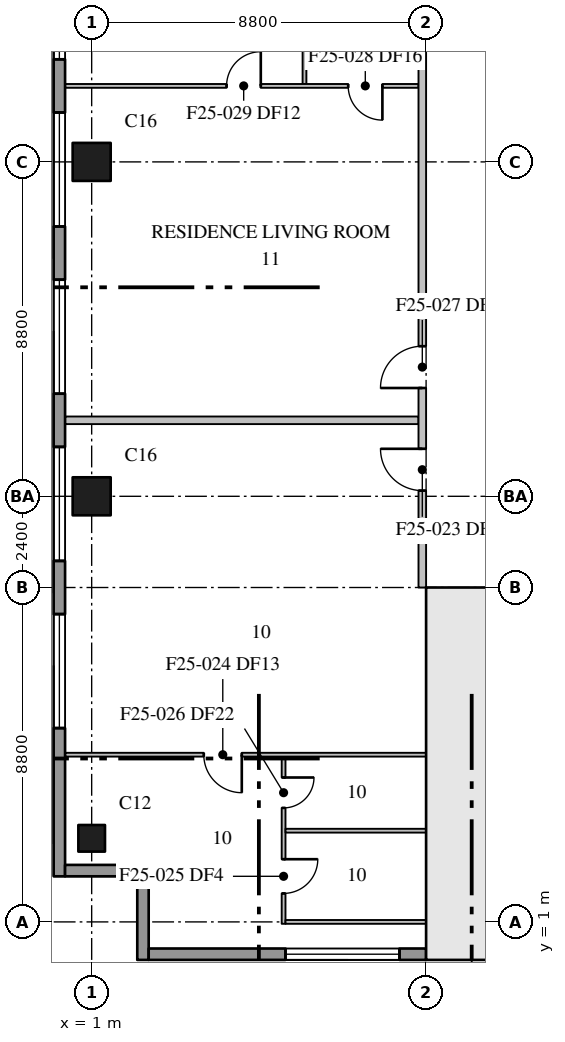
"""IFC4 building model, lengths in metres.
Left out: names, types, materials, properties, quantities, classifications, styles, units other than length and angle.
Written with IfcOpenShell. Run it as: python <this file> out.ifc"""

import sys

from ifc_helpers import new_model, si_unit, direction, frame, frame_2d, origin, origin_2d, place, context, subcontext, project, spatial, rectangle, extrude, element, fill, save


model = new_model("IFC4")
c1 = context("Model", 3, precision=1e-05, world=origin(), true_north=direction((0.0, 1.0)))
c2 = subcontext(c1, "Body", "Model", "MODEL_VIEW")
j1 = project(units=[si_unit("LENGTHUNIT", "METRE"), si_unit("PLANEANGLEUNIT", "RADIAN")], contexts=[c1])
p1 = place(None, origin())
s1 = spatial("IfcSite", under=j1, at=p1, CompositionType="ELEMENT")
p2 = place(p1, origin())
s2 = spatial("IfcBuilding", under=s1, at=p2, CompositionType="ELEMENT")
p3 = place(p2, frame((0.0, 0.0, 211.7)))
s3 = spatial("IfcBuildingStorey", under=s2, at=p3, CompositionType="ELEMENT", Elevation=211.7)
p4 = place(p3, frame((1.0, 3.2, 0.0), z_axis=(0.0, 0.0, 1.0), x_axis=(1.0, 0.0, 0.0)))
e1 = element("IfcColumn", 1, at=p4, inside=s3, PredefinedType="COLUMN", context=c2, shape_type="SweptSolid", body=[
    extrude(rectangle(XDim=0.7, YDim=0.7, at=origin_2d()), origin(), (0.0, 0.0, 1.0), 3.7),
])
for number, where, z_axis, x_axis in (
    (2, (1.0, 12.2, 0.0), (0.0, 0.0, 1.0), (1.0, 0.0, 0.0)),
    (3, (1.0, 21.0, 0.0), (0.0, 0.0, 1.0), (1.0, 0.0, 0.0)),
):
    element("IfcColumn", number, at=place(p3, frame(where, z_axis=z_axis, x_axis=x_axis)), inside=s3, PredefinedType="COLUMN", context=c2, shape_type="SweptSolid", body=[
        extrude(rectangle(XDim=1.0, YDim=1.0, at=origin_2d()), origin(), (0.0, 0.0, 1.0), 3.7),
    ])
p5 = place(p3, frame((9.8, 0.875, 0.0), z_axis=(0.0, 0.0, 1.0), x_axis=(1.0, 0.0, 0.0)))
e4 = element("IfcWall", 4, at=p5, inside=s3, PredefinedType="SHEAR", context=c2, shape_type="SweptSolid", body=[
    extrude(rectangle(XDim=35.2, YDim=0.65, at=frame_2d((17.6, 0.0))), origin(), (0.0, 0.0, 1.0), 3.7),
])
p6 = place(p3, frame((10.675, 1.2, 0.0), z_axis=(0.0, 0.0, 1.0), x_axis=(0.0, 1.0, 0.0)))
e5 = element("IfcWall", 5, at=p6, inside=s3, PredefinedType="SHEAR", context=c2, shape_type="SweptSolid", body=[
    extrude(rectangle(XDim=8.6, YDim=0.65, at=frame_2d((4.3, 0.0))), origin(), (0.0, 0.0, 1.0), 3.7),
])
p7 = place(p3, frame((9.8, 9.6, 0.0), z_axis=(0.0, 0.0, 1.0), x_axis=(1.0, 0.0, 0.0)))
e6 = element("IfcWall", 6, at=p7, inside=s3, PredefinedType="SHEAR", context=c2, shape_type="SweptSolid", body=[
    extrude(rectangle(XDim=4.3, YDim=0.4, at=frame_2d((2.15, 0.0))), origin(), (0.0, 0.0, 1.0), 3.7),
])
p8 = place(p7, frame((2.05, 0.0, 0.0)))
e7 = element("IfcOpeningElement", 7, at=p8, cuts=e6, PredefinedType="OPENING", context=c2, shape_type="SweptSolid", body=[
    extrude(rectangle(XDim=1.2, YDim=2.1, at=frame_2d((0.6, 1.05))), frame((0.0, 0.21, 0.0), z_axis=(0.0, -1.0, 0.0), x_axis=(1.0, 0.0, 0.0)), (0.0, 0.0, 1.0), 0.42),
])
p9 = place(p3, frame((0.15, 61.1, 0.0), z_axis=(0.0, 0.0, 1.0), x_axis=(0.0, -1.0, 0.0)))
e8 = element("IfcWall", 8, at=p9, inside=s3, PredefinedType="STANDARD", context=c2, shape_type="SweptSolid", body=[
    extrude(rectangle(XDim=58.9, YDim=0.3, at=frame_2d((29.45, 0.0))), origin(), (0.0, 0.0, 1.0), 3.4),
])
p10 = place(p9, frame((3.6, 0.0, 0.75)))
e9 = element("IfcOpeningElement", 9, at=p10, cuts=e8, PredefinedType="OPENING", context=c2, shape_type="SweptSolid", body=[
    extrude(rectangle(XDim=3.0, YDim=2.3, at=frame_2d((1.5, 1.15))), frame((0.0, 0.16, 0.0), z_axis=(0.0, -1.0, 0.0), x_axis=(1.0, 0.0, 0.0)), (0.0, 0.0, 1.0), 0.32),
])
p11 = place(p9, frame((8.0, 0.0, 0.75)))
e10 = element("IfcOpeningElement", 10, at=p11, cuts=e8, PredefinedType="OPENING", context=c2, shape_type="SweptSolid", body=[
    extrude(rectangle(XDim=3.0, YDim=2.3, at=frame_2d((1.5, 1.15))), frame((0.0, 0.16, 0.0), z_axis=(0.0, -1.0, 0.0), x_axis=(1.0, 0.0, 0.0)), (0.0, 0.0, 1.0), 0.32),
])
p12 = place(p9, frame((12.4, 0.0, 0.75)))
e11 = element("IfcOpeningElement", 11, at=p12, cuts=e8, PredefinedType="OPENING", context=c2, shape_type="SweptSolid", body=[
    extrude(rectangle(XDim=3.0, YDim=2.3, at=frame_2d((1.5, 1.15))), frame((0.0, 0.16, 0.0), z_axis=(0.0, -1.0, 0.0), x_axis=(1.0, 0.0, 0.0)), (0.0, 0.0, 1.0), 0.32),
])
p13 = place(p9, frame((16.8, 0.0, 0.75)))
e12 = element("IfcOpeningElement", 12, at=p13, cuts=e8, PredefinedType="OPENING", context=c2, shape_type="SweptSolid", body=[
    extrude(rectangle(XDim=3.0, YDim=2.3, at=frame_2d((1.5, 1.15))), frame((0.0, 0.16, 0.0), z_axis=(0.0, -1.0, 0.0), x_axis=(1.0, 0.0, 0.0)), (0.0, 0.0, 1.0), 0.32),
])
p14 = place(p9, frame((21.2, 0.0, 0.75)))
e13 = element("IfcOpeningElement", 13, at=p14, cuts=e8, PredefinedType="OPENING", context=c2, shape_type="SweptSolid", body=[
    extrude(rectangle(XDim=3.0, YDim=2.3, at=frame_2d((1.5, 1.15))), frame((0.0, 0.16, 0.0), z_axis=(0.0, -1.0, 0.0), x_axis=(1.0, 0.0, 0.0)), (0.0, 0.0, 1.0), 0.32),
])
p15 = place(p9, frame((25.6, 0.0, 0.75)))
e14 = element("IfcOpeningElement", 14, at=p15, cuts=e8, PredefinedType="OPENING", context=c2, shape_type="SweptSolid", body=[
    extrude(rectangle(XDim=3.0, YDim=2.3, at=frame_2d((1.5, 1.15))), frame((0.0, 0.16, 0.0), z_axis=(0.0, -1.0, 0.0), x_axis=(1.0, 0.0, 0.0)), (0.0, 0.0, 1.0), 0.32),
])
p16 = place(p9, frame((30.0, 0.0, 0.75)))
e15 = element("IfcOpeningElement", 15, at=p16, cuts=e8, PredefinedType="OPENING", context=c2, shape_type="SweptSolid", body=[
    extrude(rectangle(XDim=3.0, YDim=2.3, at=frame_2d((1.5, 1.15))), frame((0.0, 0.16, 0.0), z_axis=(0.0, -1.0, 0.0), x_axis=(1.0, 0.0, 0.0)), (0.0, 0.0, 1.0), 0.32),
])
p17 = place(p9, frame((34.4, 0.0, 0.75)))
e16 = element("IfcOpeningElement", 16, at=p17, cuts=e8, PredefinedType="OPENING", context=c2, shape_type="SweptSolid", body=[
    extrude(rectangle(XDim=3.0, YDim=2.3, at=frame_2d((1.5, 1.15))), frame((0.0, 0.16, 0.0), z_axis=(0.0, -1.0, 0.0), x_axis=(1.0, 0.0, 0.0)), (0.0, 0.0, 1.0), 0.32),
])
p18 = place(p9, frame((38.8, 0.0, 0.75)))
e17 = element("IfcOpeningElement", 17, at=p18, cuts=e8, PredefinedType="OPENING", context=c2, shape_type="SweptSolid", body=[
    extrude(rectangle(XDim=3.0, YDim=2.3, at=frame_2d((1.5, 1.15))), frame((0.0, 0.16, 0.0), z_axis=(0.0, -1.0, 0.0), x_axis=(1.0, 0.0, 0.0)), (0.0, 0.0, 1.0), 0.32),
])
p19 = place(p9, frame((43.2, 0.0, 0.75)))
e18 = element("IfcOpeningElement", 18, at=p19, cuts=e8, PredefinedType="OPENING", context=c2, shape_type="SweptSolid", body=[
    extrude(rectangle(XDim=3.0, YDim=2.3, at=frame_2d((1.5, 1.15))), frame((0.0, 0.16, 0.0), z_axis=(0.0, -1.0, 0.0), x_axis=(1.0, 0.0, 0.0)), (0.0, 0.0, 1.0), 0.32),
])
p20 = place(p9, frame((47.6, 0.0, 0.75)))
e19 = element("IfcOpeningElement", 19, at=p20, cuts=e8, PredefinedType="OPENING", context=c2, shape_type="SweptSolid", body=[
    extrude(rectangle(XDim=3.0, YDim=2.3, at=frame_2d((1.5, 1.15))), frame((0.0, 0.16, 0.0), z_axis=(0.0, -1.0, 0.0), x_axis=(1.0, 0.0, 0.0)), (0.0, 0.0, 1.0), 0.32),
])
p21 = place(p9, frame((52.0, 0.0, 0.75)))
e20 = element("IfcOpeningElement", 20, at=p21, cuts=e8, PredefinedType="OPENING", context=c2, shape_type="SweptSolid", body=[
    extrude(rectangle(XDim=3.0, YDim=2.3, at=frame_2d((1.5, 1.15))), frame((0.0, 0.16, 0.0), z_axis=(0.0, -1.0, 0.0), x_axis=(1.0, 0.0, 0.0)), (0.0, 0.0, 1.0), 0.32),
])
for number, where, z_axis, x_axis in (
    (21, (0.3, 2.35, 0.0), (0.0, 0.0, 1.0), (1.0, 0.0, 0.0)),
    (22, (2.35, 2.2, 0.0), (0.0, 0.0, 1.0), (0.0, -1.0, 0.0)),
):
    element("IfcWall", number, at=place(p3, frame(where, z_axis=z_axis, x_axis=x_axis)), inside=s3, PredefinedType="STANDARD", context=c2, shape_type="SweptSolid", body=[
        extrude(rectangle(XDim=2.2, YDim=0.3, at=frame_2d((1.1, 0.0))), origin(), (0.0, 0.0, 1.0), 3.4),
    ])
p22 = place(p3, frame((2.5, 0.15, 0.0), z_axis=(0.0, 0.0, 1.0), x_axis=(1.0, 0.0, 0.0)))
e23 = element("IfcWall", 23, at=p22, inside=s3, PredefinedType="STANDARD", context=c2, shape_type="SweptSolid", body=[
    extrude(rectangle(XDim=7.3, YDim=0.3, at=frame_2d((3.65, 0.0))), origin(), (0.0, 0.0, 1.0), 3.4),
])
p23 = place(p22, frame((3.6, 0.0, 0.75)))
e24 = element("IfcOpeningElement", 24, at=p23, cuts=e23, PredefinedType="OPENING", context=c2, shape_type="SweptSolid", body=[
    extrude(rectangle(XDim=3.0, YDim=2.3, at=frame_2d((1.5, 1.15))), frame((0.0, 0.16, 0.0), z_axis=(0.0, -1.0, 0.0), x_axis=(1.0, 0.0, 0.0)), (0.0, 0.0, 1.0), 0.32),
])
p24 = place(p3, frame((9.7, 9.8, 0.0), z_axis=(0.0, 0.0, 1.0), x_axis=(0.0, 1.0, 0.0)))
e25 = element("IfcWall", 25, at=p24, inside=s3, PredefinedType="PARTITIONING", context=c2, shape_type="SweptSolid", body=[
    extrude(rectangle(XDim=17.6, YDim=0.2, at=frame_2d((8.8, 0.0))), origin(), (0.0, 0.0, 1.0), 3.4),
])
p25 = place(p24, frame((2.55, 0.0, 0.0)))
e26 = element("IfcOpeningElement", 26, at=p25, cuts=e25, PredefinedType="OPENING", context=c2, shape_type="SweptSolid", body=[
    extrude(rectangle(XDim=1.1, YDim=2.1, at=frame_2d((0.55, 1.05))), frame((0.0, 0.11, 0.0), z_axis=(0.0, -1.0, 0.0), x_axis=(1.0, 0.0, 0.0)), (0.0, 0.0, 1.0), 0.22),
])
p26 = place(p24, frame((5.25, 0.0, 0.0)))
e27 = element("IfcOpeningElement", 27, at=p26, cuts=e25, PredefinedType="OPENING", context=c2, shape_type="SweptSolid", body=[
    extrude(rectangle(XDim=1.1, YDim=2.1, at=frame_2d((0.55, 1.05))), frame((0.0, 0.11, 0.0), z_axis=(0.0, -1.0, 0.0), x_axis=(1.0, 0.0, 0.0)), (0.0, 0.0, 1.0), 0.22),
])
p27 = place(p3, frame((0.31, 14.2, 0.0), z_axis=(0.0, 0.0, 1.0), x_axis=(1.0, 0.0, 0.0)))
e28 = element("IfcWall", 28, at=p27, inside=s3, PredefinedType="PARTITIONING", context=c2, shape_type="SweptSolid", body=[
    extrude(rectangle(XDim=9.29, YDim=0.2, at=frame_2d((4.645, 0.0))), origin(), (0.0, 0.0, 1.0), 3.4),
])
p28 = place(p3, frame((6.05, 5.35, 0.0), z_axis=(0.0, 0.0, 1.0), x_axis=(0.0, -1.0, 0.0)))
e29 = element("IfcWall", 29, at=p28, inside=s3, PredefinedType="PARTITIONING", context=c2, shape_type="SweptSolid", body=[
    extrude(rectangle(XDim=4.4, YDim=0.1, at=frame_2d((2.2, 0.0))), origin(), (0.0, 0.0, 1.0), 3.4),
])
p29 = place(p28, frame((2.7, 0.0, 0.0)))
e30 = element("IfcOpeningElement", 30, at=p29, cuts=e29, PredefinedType="OPENING", context=c2, shape_type="SweptSolid", body=[
    extrude(rectangle(XDim=0.9, YDim=2.1, at=frame_2d((0.45, 1.05))), frame((0.0, 0.06, 0.0), z_axis=(0.0, -1.0, 0.0), x_axis=(1.0, 0.0, 0.0)), (0.0, 0.0, 1.0), 0.12),
])
p30 = place(p28, frame((0.55, 0.0, 0.0)))
e31 = element("IfcOpeningElement", 31, at=p30, cuts=e29, PredefinedType="OPENING", context=c2, shape_type="SweptSolid", body=[
    extrude(rectangle(XDim=0.8, YDim=2.1, at=frame_2d((0.4, 1.05))), frame((0.0, 0.06, 0.0), z_axis=(0.0, -1.0, 0.0), x_axis=(1.0, 0.0, 0.0)), (0.0, 0.0, 1.0), 0.12),
])
p31 = place(p3, frame((9.8, 5.4, 0.0), z_axis=(0.0, 0.0, 1.0), x_axis=(-1.0, 0.0, 0.0)))
e32 = element("IfcWall", 32, at=p31, inside=s3, PredefinedType="PARTITIONING", context=c2, shape_type="SweptSolid", body=[
    extrude(rectangle(XDim=9.49, YDim=0.1, at=frame_2d((4.745, 0.0))), origin(), (0.0, 0.0, 1.0), 3.4),
])
p32 = place(p31, frame((4.85, 0.0, 0.0)))
e33 = element("IfcOpeningElement", 33, at=p32, cuts=e32, PredefinedType="OPENING", context=c2, shape_type="SweptSolid", body=[
    extrude(rectangle(XDim=1.0, YDim=2.1, at=frame_2d((0.5, 1.05))), frame((0.0, 0.06, 0.0), z_axis=(0.0, -1.0, 0.0), x_axis=(1.0, 0.0, 0.0)), (0.0, 0.0, 1.0), 0.12),
])
for number, where, z_axis, x_axis in (
    (34, (6.1, 1.0, 0.0), (0.0, 0.0, 1.0), (1.0, 0.0, 0.0)),
    (35, (6.1, 3.4, 0.0), (0.0, 0.0, 1.0), (1.0, 0.0, 0.0)),
):
    element("IfcWall", number, at=place(p3, frame(where, z_axis=z_axis, x_axis=x_axis)), inside=s3, PredefinedType="PARTITIONING", context=c2, shape_type="SweptSolid", body=[
        extrude(rectangle(XDim=3.7, YDim=0.1, at=frame_2d((1.85, 0.0))), origin(), (0.0, 0.0, 1.0), 3.4),
    ])
p33 = place(p3, frame((6.6, 27.2, 0.0), z_axis=(0.0, 0.0, 1.0), x_axis=(0.0, -1.0, 0.0)))
e36 = element("IfcWall", 36, at=p33, inside=s3, PredefinedType="PARTITIONING", context=c2, shape_type="SweptSolid", body=[
    extrude(rectangle(XDim=4.15, YDim=0.1, at=frame_2d((2.075, 0.0))), origin(), (0.0, 0.0, 1.0), 3.4),
])
p34 = place(p33, frame((0.25, 0.0, 0.0)))
e37 = element("IfcOpeningElement", 37, at=p34, cuts=e36, PredefinedType="OPENING", context=c2, shape_type="SweptSolid", body=[
    extrude(rectangle(XDim=0.9, YDim=2.1, at=frame_2d((0.45, 1.05))), frame((0.0, 0.06, 0.0), z_axis=(0.0, -1.0, 0.0), x_axis=(1.0, 0.0, 0.0)), (0.0, 0.0, 1.0), 0.12),
])
p35 = place(p3, frame((0.31, 23.0, 0.0), z_axis=(0.0, 0.0, 1.0), x_axis=(1.0, 0.0, 0.0)))
e38 = element("IfcWall", 38, at=p35, inside=s3, PredefinedType="PARTITIONING", context=c2, shape_type="SweptSolid", body=[
    extrude(rectangle(XDim=9.29, YDim=0.1, at=frame_2d((4.645, 0.0))), origin(), (0.0, 0.0, 1.0), 3.4),
])
p36 = place(p35, frame((7.44, 0.0, 0.0)))
e39 = element("IfcOpeningElement", 39, at=p36, cuts=e38, PredefinedType="OPENING", context=c2, shape_type="SweptSolid", body=[
    extrude(rectangle(XDim=0.9, YDim=2.1, at=frame_2d((0.45, 1.05))), frame((0.0, 0.06, 0.0), z_axis=(0.0, -1.0, 0.0), x_axis=(1.0, 0.0, 0.0)), (0.0, 0.0, 1.0), 0.12),
])
p37 = place(p35, frame((4.24, 0.0, 0.0)))
e40 = element("IfcOpeningElement", 40, at=p37, cuts=e38, PredefinedType="OPENING", context=c2, shape_type="SweptSolid", body=[
    extrude(rectangle(XDim=0.9, YDim=2.1, at=frame_2d((0.45, 1.05))), frame((0.0, 0.06, 0.0), z_axis=(0.0, -1.0, 0.0), x_axis=(1.0, 0.0, 0.0)), (0.0, 0.0, 1.0), 0.12),
])
p38 = place(p17, origin())
e41 = element("IfcWindow", 41, at=p38, inside=s3, PartitioningType="SINGLE_PANEL", PredefinedType="WINDOW", context=c2, shape_type="SweptSolid", body=[
    extrude(rectangle(XDim=3.0, YDim=2.3, at=frame_2d((1.5, 1.15))), frame((0.0, 0.03, 0.0), z_axis=(0.0, -1.0, 0.0), x_axis=(1.0, 0.0, 0.0)), (0.0, 0.0, 1.0), 0.06),
])
fill(e16, e41)
p39 = place(p18, origin())
e42 = element("IfcWindow", 42, at=p39, inside=s3, PartitioningType="SINGLE_PANEL", PredefinedType="WINDOW", context=c2, shape_type="SweptSolid", body=[
    extrude(rectangle(XDim=3.0, YDim=2.3, at=frame_2d((1.5, 1.15))), frame((0.0, 0.03, 0.0), z_axis=(0.0, -1.0, 0.0), x_axis=(1.0, 0.0, 0.0)), (0.0, 0.0, 1.0), 0.06),
])
fill(e17, e42)
p40 = place(p19, origin())
e43 = element("IfcWindow", 43, at=p40, inside=s3, PartitioningType="SINGLE_PANEL", PredefinedType="WINDOW", context=c2, shape_type="SweptSolid", body=[
    extrude(rectangle(XDim=3.0, YDim=2.3, at=frame_2d((1.5, 1.15))), frame((0.0, 0.03, 0.0), z_axis=(0.0, -1.0, 0.0), x_axis=(1.0, 0.0, 0.0)), (0.0, 0.0, 1.0), 0.06),
])
fill(e18, e43)
p41 = place(p20, origin())
e44 = element("IfcWindow", 44, at=p41, inside=s3, PartitioningType="SINGLE_PANEL", PredefinedType="WINDOW", context=c2, shape_type="SweptSolid", body=[
    extrude(rectangle(XDim=3.0, YDim=2.3, at=frame_2d((1.5, 1.15))), frame((0.0, 0.03, 0.0), z_axis=(0.0, -1.0, 0.0), x_axis=(1.0, 0.0, 0.0)), (0.0, 0.0, 1.0), 0.06),
])
fill(e19, e44)
p42 = place(p21, origin())
e45 = element("IfcWindow", 45, at=p42, inside=s3, PartitioningType="SINGLE_PANEL", PredefinedType="WINDOW", context=c2, shape_type="SweptSolid", body=[
    extrude(rectangle(XDim=3.0, YDim=2.3, at=frame_2d((1.5, 1.15))), frame((0.0, 0.03, 0.0), z_axis=(0.0, -1.0, 0.0), x_axis=(1.0, 0.0, 0.0)), (0.0, 0.0, 1.0), 0.06),
])
fill(e20, e45)
p43 = place(p23, origin())
e46 = element("IfcWindow", 46, at=p43, inside=s3, PartitioningType="SINGLE_PANEL", PredefinedType="WINDOW", context=c2, shape_type="SweptSolid", body=[
    extrude(rectangle(XDim=3.0, YDim=2.3, at=frame_2d((1.5, 1.15))), frame((0.0, 0.03, 0.0), z_axis=(0.0, -1.0, 0.0), x_axis=(1.0, 0.0, 0.0)), (0.0, 0.0, 1.0), 0.06),
])
fill(e24, e46)
p44 = place(p25, origin())
e47 = element("IfcDoor", 47, at=p44, inside=s3, OperationType="SINGLE_SWING_RIGHT", PredefinedType="DOOR", context=c2, shape_type="SweptSolid", body=[
    extrude(rectangle(XDim=1.1, YDim=2.1, at=frame_2d((0.55, 1.05))), frame((0.0, 0.025, 0.0), z_axis=(0.0, -1.0, 0.0), x_axis=(1.0, 0.0, 0.0)), (0.0, 0.0, 1.0), 0.05),
])
fill(e26, e47)
p45 = place(p32, origin())
e48 = element("IfcDoor", 48, at=p45, inside=s3, OperationType="SINGLE_SWING_LEFT", PredefinedType="DOOR", context=c2, shape_type="SweptSolid", body=[
    extrude(rectangle(XDim=1.0, YDim=2.1, at=frame_2d((0.5, 1.05))), frame((0.0, 0.025, 0.0), z_axis=(0.0, -1.0, 0.0), x_axis=(1.0, 0.0, 0.0)), (0.0, 0.0, 1.0), 0.05),
])
fill(e33, e48)
p46 = place(p29, origin())
e49 = element("IfcDoor", 49, at=p46, inside=s3, OperationType="SINGLE_SWING_LEFT", PredefinedType="DOOR", context=c2, shape_type="SweptSolid", body=[
    extrude(rectangle(XDim=0.9, YDim=2.1, at=frame_2d((0.45, 1.05))), frame((0.0, 0.025, 0.0), z_axis=(0.0, -1.0, 0.0), x_axis=(1.0, 0.0, 0.0)), (0.0, 0.0, 1.0), 0.05),
])
fill(e30, e49)
p47 = place(p30, origin())
e50 = element("IfcDoor", 50, at=p47, inside=s3, OperationType="SINGLE_SWING_LEFT", PredefinedType="DOOR", context=c2, shape_type="SweptSolid", body=[
    extrude(rectangle(XDim=0.8, YDim=2.1, at=frame_2d((0.4, 1.05))), frame((0.0, 0.025, 0.0), z_axis=(0.0, -1.0, 0.0), x_axis=(1.0, 0.0, 0.0)), (0.0, 0.0, 1.0), 0.05),
])
fill(e31, e50)
p48 = place(p26, origin())
e51 = element("IfcDoor", 51, at=p48, inside=s3, OperationType="SINGLE_SWING_LEFT", PredefinedType="DOOR", context=c2, shape_type="SweptSolid", body=[
    extrude(rectangle(XDim=1.1, YDim=2.1, at=frame_2d((0.55, 1.05))), frame((0.0, 0.025, 0.0), z_axis=(0.0, -1.0, 0.0), x_axis=(1.0, 0.0, 0.0)), (0.0, 0.0, 1.0), 0.05),
])
fill(e27, e51)
p49 = place(p36, frame((0.9, 0.0, 0.0), z_axis=(0.0, 0.0, 1.0), x_axis=(-1.0, 0.0, 0.0)))
e52 = element("IfcDoor", 52, at=p49, inside=s3, OperationType="SINGLE_SWING_RIGHT", PredefinedType="DOOR", context=c2, shape_type="SweptSolid", body=[
    extrude(rectangle(XDim=0.9, YDim=2.1, at=frame_2d((0.45, 1.05))), frame((0.0, 0.025, 0.0), z_axis=(0.0, -1.0, 0.0), x_axis=(1.0, 0.0, 0.0)), (0.0, 0.0, 1.0), 0.05),
])
fill(e39, e52)
p50 = place(p37, origin())
e53 = element("IfcDoor", 53, at=p50, inside=s3, OperationType="SINGLE_SWING_RIGHT", PredefinedType="DOOR", context=c2, shape_type="SweptSolid", body=[
    extrude(rectangle(XDim=0.9, YDim=2.1, at=frame_2d((0.45, 1.05))), frame((0.0, 0.025, 0.0), z_axis=(0.0, -1.0, 0.0), x_axis=(1.0, 0.0, 0.0)), (0.0, 0.0, 1.0), 0.05),
])
fill(e40, e53)
save(model, sys.argv[1])
